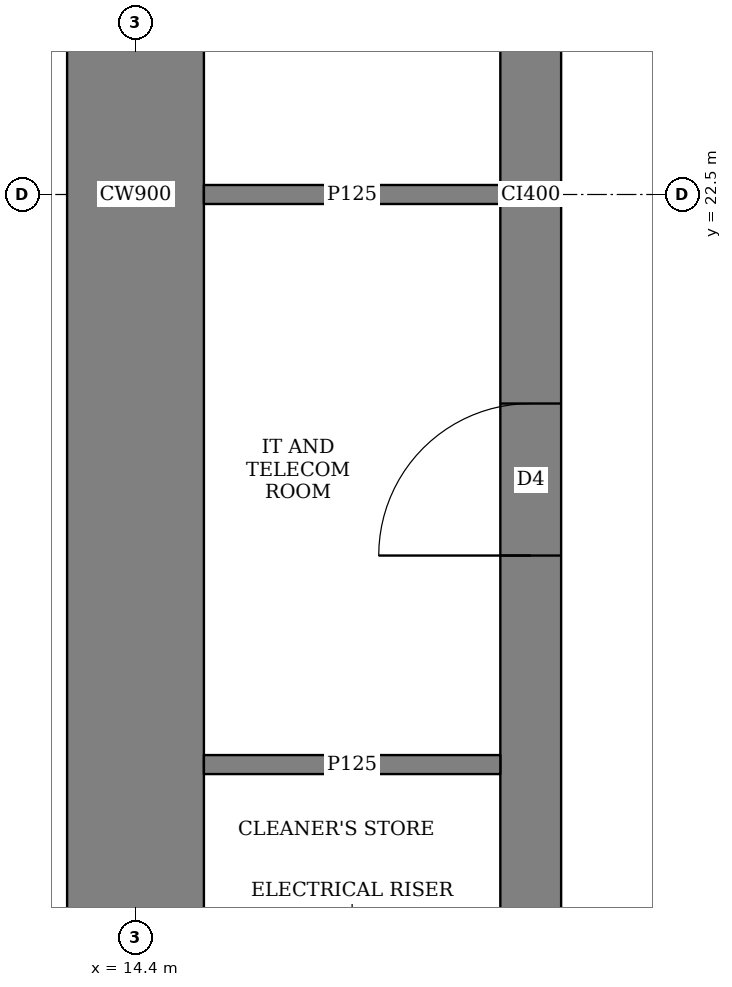
"""IFC4 building model, lengths in metres.
Left out: names, types, materials, properties, quantities, classifications, styles, units other than length and angle.
Written with IfcOpenShell. Run it as: python <this file> out.ifc"""

import sys

from ifc_helpers import new_model, si_unit, direction, frame, frame_2d, origin, place, context, subcontext, project, spatial, rectangle, extrude, element, fill, save


model = new_model("IFC4")
c1 = context("Model", 3, precision=1e-05, world=origin(), true_north=direction((0.0, 1.0)))
c2 = subcontext(c1, "Body", "Model", "MODEL_VIEW")
j1 = project(units=[si_unit("LENGTHUNIT", "METRE"), si_unit("PLANEANGLEUNIT", "RADIAN")], contexts=[c1])
p1 = place(None, origin())
s1 = spatial("IfcSite", under=j1, at=p1, CompositionType="ELEMENT")
p2 = place(p1, origin())
s2 = spatial("IfcBuilding", under=s1, at=p2, CompositionType="ELEMENT")
p3 = place(p2, frame((0.0, 0.0, 251.6)))
s3 = spatial("IfcBuildingStorey", under=s2, at=p3, CompositionType="ELEMENT", Elevation=251.6)
p4 = place(p3, frame((14.4, 15.45, 0.0), z_axis=(0.0, 0.0, 1.0), x_axis=(0.0, 1.0, 0.0)))
e1 = element("IfcWall", 1, at=p4, inside=s3, PredefinedType="SHEAR", context=c2, shape_type="SweptSolid", body=[
    extrude(rectangle(XDim=14.1, YDim=0.9, at=frame_2d((7.05, 0.0))), origin(), (0.0, 0.0, 1.0), 3.75),
])
p5 = place(p3, frame((17.0, 15.45, 0.0), z_axis=(0.0, 0.0, 1.0), x_axis=(0.0, 1.0, 0.0)))
e2 = element("IfcWall", 2, at=p5, inside=s3, PredefinedType="SHEAR", context=c2, shape_type="SweptSolid", body=[
    extrude(rectangle(XDim=14.1, YDim=0.4, at=frame_2d((7.05, 0.0))), origin(), (0.0, 0.0, 1.0), 3.75),
])
p6 = place(p5, frame((1.05, 0.0, 0.0)))
e3 = element("IfcOpeningElement", 3, at=p6, cuts=e2, PredefinedType="OPENING", context=c2, shape_type="SweptSolid", body=[
    extrude(rectangle(XDim=1.0, YDim=2.1, at=frame_2d((0.5, 1.05))), frame((0.0, 0.21, 0.0), z_axis=(0.0, -1.0, 0.0), x_axis=(1.0, 0.0, 0.0)), (0.0, 0.0, 1.0), 0.42),
])
p7 = place(p5, frame((4.675, 0.0, 0.0)))
e4 = element("IfcOpeningElement", 4, at=p7, cuts=e2, PredefinedType="OPENING", context=c2, shape_type="SweptSolid", body=[
    extrude(rectangle(XDim=1.0, YDim=2.1, at=frame_2d((0.5, 1.05))), frame((0.0, 0.21, 0.0), z_axis=(0.0, -1.0, 0.0), x_axis=(1.0, 0.0, 0.0)), (0.0, 0.0, 1.0), 0.42),
])
p8 = place(p5, frame((8.425, 0.0, 0.0)))
e5 = element("IfcOpeningElement", 5, at=p8, cuts=e2, PredefinedType="OPENING", context=c2, shape_type="SweptSolid", body=[
    extrude(rectangle(XDim=1.0, YDim=2.1, at=frame_2d((0.5, 1.05))), frame((0.0, 0.21, 0.0), z_axis=(0.0, -1.0, 0.0), x_axis=(1.0, 0.0, 0.0)), (0.0, 0.0, 1.0), 0.42),
])
p9 = place(p5, frame((12.175, 0.0, 0.0)))
e6 = element("IfcOpeningElement", 6, at=p9, cuts=e2, PredefinedType="OPENING", context=c2, shape_type="SweptSolid", body=[
    extrude(rectangle(XDim=1.0, YDim=2.1, at=frame_2d((0.5, 1.05))), frame((0.0, 0.21, 0.0), z_axis=(0.0, -1.0, 0.0), x_axis=(1.0, 0.0, 0.0)), (0.0, 0.0, 1.0), 0.42),
])
for number, where, z_axis, x_axis in (
    (7, (14.85, 18.75, 0.0), (0.0, 0.0, 1.0), (1.0, 0.0, 0.0)),
    (8, (14.85, 22.5, 0.0), (0.0, 0.0, 1.0), (1.0, 0.0, 0.0)),
):
    element("IfcWall", number, at=place(p3, frame(where, z_axis=z_axis, x_axis=x_axis)), inside=s3, PredefinedType="PARTITIONING", context=c2, shape_type="SweptSolid", body=[
        extrude(rectangle(XDim=1.95, YDim=0.125, at=frame_2d((0.975, 0.0))), origin(), (0.0, 0.0, 1.0), 3.5),
    ])
p10 = place(p7, origin())
e9 = element("IfcDoor", 9, at=p10, inside=s3, OperationType="SINGLE_SWING_LEFT", PredefinedType="DOOR", context=c2, shape_type="SweptSolid", body=[
    extrude(rectangle(XDim=1.0, YDim=2.1, at=frame_2d((0.5, 1.05))), frame((0.0, 0.025, 0.0), z_axis=(0.0, -1.0, 0.0), x_axis=(1.0, 0.0, 0.0)), (0.0, 0.0, 1.0), 0.05),
])
fill(e4, e9)
save(model, sys.argv[1])
